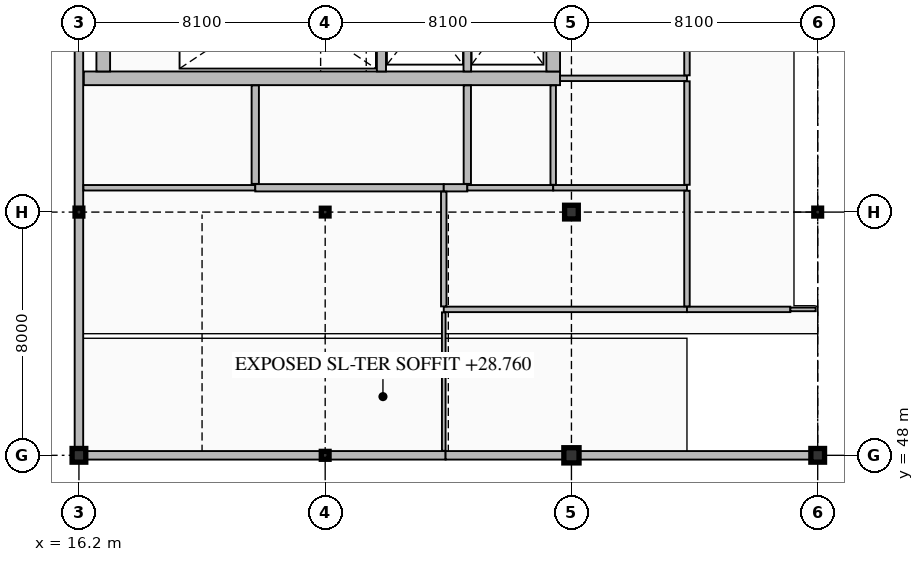
"""IFC4 building model, lengths in metres.
Left out: names, types, materials, properties, quantities, classifications, styles, units other than length and angle.
Written with IfcOpenShell. Run it as: python <this file> out.ifc"""

import sys

from ifc_helpers import new_model, si_unit, direction, frame, frame_2d, origin, origin_2d, place, context, subcontext, project, spatial, rectangle, hollow_rectangle, i_section, extrude, element, fill, save


model = new_model("IFC4")
c1 = context("Model", 3, precision=1e-05, world=origin(), true_north=direction((0.0, 1.0)))
c2 = subcontext(c1, "Body", "Model", "MODEL_VIEW")
j1 = project(units=[si_unit("LENGTHUNIT", "METRE"), si_unit("PLANEANGLEUNIT", "RADIAN")], contexts=[c1])
p1 = place(None, origin())
s1 = spatial("IfcSite", under=j1, at=p1, CompositionType="ELEMENT")
p2 = place(p1, origin())
s2 = spatial("IfcBuilding", under=s1, at=p2, CompositionType="ELEMENT")
p3 = place(p2, frame((0.0, 0.0, 24.9)))
s3 = spatial("IfcBuildingStorey", under=s2, at=p3, CompositionType="ELEMENT", Elevation=24.9)
p4 = place(p3, frame((16.36, 60.4, 0.0), z_axis=(0.0, 0.0, 1.0), x_axis=(1.0, 0.0, 0.0)))
e1 = element("IfcWall", 1, at=p4, inside=s3, PredefinedType="SHEAR", context=c2, shape_type="SweptSolid", body=[
    extrude(rectangle(XDim=15.665, YDim=0.45, at=frame_2d((7.833, 0.0))), origin(), (0.0, 0.0, 1.0), 4.2),
])
p5 = place(p4, frame((1.39, 0.0, 0.0)))
e2 = element("IfcOpeningElement", 2, at=p5, cuts=e1, PredefinedType="OPENING", context=c2, shape_type="SweptSolid", body=[
    extrude(rectangle(XDim=1.15, YDim=2.25, at=frame_2d((0.575, 1.125))), frame((0.0, 0.235, 0.0), z_axis=(0.0, -1.0, 0.0), x_axis=(1.0, 0.0, 0.0)), (0.0, 0.0, 1.0), 0.47),
])
p6 = place(p4, frame((10.673, 0.0, 0.0)))
e3 = element("IfcOpeningElement", 3, at=p6, cuts=e1, PredefinedType="OPENING", context=c2, shape_type="SweptSolid", body=[
    extrude(rectangle(XDim=1.1, YDim=2.2, at=frame_2d((0.55, 1.1))), frame((0.0, 0.235, 0.0), z_axis=(0.0, -1.0, 0.0), x_axis=(1.0, 0.0, 0.0)), (0.0, 0.0, 1.0), 0.47),
])
p7 = place(p4, frame((13.387, 0.0, 0.0)))
e4 = element("IfcOpeningElement", 4, at=p7, cuts=e1, PredefinedType="OPENING", context=c2, shape_type="SweptSolid", body=[
    extrude(rectangle(XDim=1.1, YDim=2.2, at=frame_2d((0.55, 1.1))), frame((0.0, 0.235, 0.0), z_axis=(0.0, -1.0, 0.0), x_axis=(1.0, 0.0, 0.0)), (0.0, 0.0, 1.0), 0.47),
])
for number, where, z_axis, x_axis in (
    (5, (17.0, 60.625, 0.0), (0.0, 0.0, 1.0), (0.0, 1.0, 0.0)),
    (6, (31.8, 60.625, 0.0), (0.0, 0.0, 1.0), (0.0, 1.0, 0.0)),
):
    element("IfcWall", number, at=place(p3, frame(where, z_axis=z_axis, x_axis=x_axis)), inside=s3, PredefinedType="SHEAR", context=c2, shape_type="SweptSolid", body=[
        extrude(rectangle(XDim=7.95, YDim=0.45, at=frame_2d((3.975, 0.0))), origin(), (0.0, 0.0, 1.0), 4.2),
    ])
p8 = place(p3, frame((26.15, 60.625, 0.0), z_axis=(0.0, 0.0, 1.0), x_axis=(0.0, 1.0, 0.0)))
e7 = element("IfcWall", 7, at=p8, inside=s3, PredefinedType="SHEAR", context=c2, shape_type="SweptSolid", body=[
    extrude(rectangle(XDim=7.95, YDim=0.3, at=frame_2d((3.975, 0.0))), origin(), (0.0, 0.0, 1.0), 4.2),
])
p9 = place(p3, frame((28.975, 60.625, 0.0), z_axis=(0.0, 0.0, 1.0), x_axis=(0.0, 1.0, 0.0)))
e8 = element("IfcWall", 8, at=p9, inside=s3, PredefinedType="SHEAR", context=c2, shape_type="SweptSolid", body=[
    extrude(rectangle(XDim=7.95, YDim=0.25, at=frame_2d((3.975, 0.0))), origin(), (0.0, 0.0, 1.0), 4.2),
])
p10 = place(p3, frame((16.2, 48.0, 0.0), z_axis=(0.0, 0.0, 1.0), x_axis=(1.0, 0.0, 0.0)))
e9 = element("IfcColumn", 9, at=p10, inside=s3, PredefinedType="COLUMN", context=c2, shape_type="SweptSolid", body=[
    extrude(rectangle(XDim=0.45, YDim=0.45, at=origin_2d()), origin(), (0.0, 0.0, 1.0), 3.86),
])
p11 = place(p3, frame((16.2, 56.0, 0.0), z_axis=(0.0, 0.0, 1.0), x_axis=(1.0, 0.0, 0.0)))
e10 = element("IfcColumn", 10, at=p11, inside=s3, PredefinedType="COLUMN", context=c2, shape_type="SweptSolid", body=[
    extrude(i_section(OverallWidth=0.256, OverallDepth=0.26, WebThickness=0.011, FlangeThickness=0.017, FilletRadius=0.013, at=origin_2d()), origin(), (0.0, 0.0, 1.0), 4.2),
])
p12 = place(p3, frame((24.3, 48.0, 0.0), z_axis=(0.0, 0.0, 1.0), x_axis=(1.0, 0.0, 0.0)))
e11 = element("IfcColumn", 11, at=p12, inside=s3, PredefinedType="COLUMN", context=c2, shape_type="SweptSolid", body=[
    extrude(i_section(OverallWidth=0.256, OverallDepth=0.26, WebThickness=0.011, FlangeThickness=0.017, FilletRadius=0.013, at=origin_2d()), origin(), (0.0, 0.0, 1.0), 3.86),
])
p13 = place(p3, frame((24.3, 56.0, 0.0), z_axis=(0.0, 0.0, 1.0), x_axis=(1.0, 0.0, 0.0)))
e12 = element("IfcColumn", 12, at=p13, inside=s3, PredefinedType="COLUMN", context=c2, shape_type="SweptSolid", body=[
    extrude(hollow_rectangle(XDim=0.254, YDim=0.254, WallThickness=0.013, InnerFilletRadius=0.013, OuterFilletRadius=0.025, at=origin_2d()), origin(), (0.0, 0.0, 1.0), 4.2),
])
p14 = place(p3, frame((32.4, 48.0, 0.0), z_axis=(0.0, 0.0, 1.0), x_axis=(1.0, 0.0, 0.0)))
e13 = element("IfcColumn", 13, at=p14, inside=s3, PredefinedType="COLUMN", context=c2, shape_type="SweptSolid", body=[
    extrude(rectangle(XDim=0.5, YDim=0.5, at=origin_2d()), origin(), (0.0, 0.0, 1.0), 3.86),
])
p15 = place(p3, frame((32.4, 56.0, 0.0), z_axis=(0.0, 0.0, 1.0), x_axis=(1.0, 0.0, 0.0)))
e14 = element("IfcColumn", 14, at=p15, inside=s3, PredefinedType="COLUMN", context=c2, shape_type="SweptSolid", body=[
    extrude(rectangle(XDim=0.45, YDim=0.45, at=origin_2d()), origin(), (0.0, 0.0, 1.0), 4.2),
])
p16 = place(p3, frame((40.5, 48.0, 0.0), z_axis=(0.0, 0.0, 1.0), x_axis=(1.0, 0.0, 0.0)))
e15 = element("IfcColumn", 15, at=p16, inside=s3, PredefinedType="COLUMN", context=c2, shape_type="SweptSolid", body=[
    extrude(rectangle(XDim=0.45, YDim=0.45, at=origin_2d()), origin(), (0.0, 0.0, 1.0), 3.96),
])
p17 = place(p3, frame((40.5, 56.0, 0.0), z_axis=(0.0, 0.0, 1.0), x_axis=(1.0, 0.0, 0.0)))
e16 = element("IfcColumn", 16, at=p17, inside=s3, PredefinedType="COLUMN", context=c2, shape_type="SweptSolid", body=[
    extrude(i_section(OverallWidth=0.256, OverallDepth=0.26, WebThickness=0.011, FlangeThickness=0.017, FilletRadius=0.013, at=origin_2d()), origin(), (0.0, 0.0, 1.0), 4.2),
])
p18 = place(p3, frame((16.2, 64.0, 0.0), z_axis=(0.0, 0.0, 1.0), x_axis=(0.0, -1.0, 0.0)))
e17 = element("IfcWall", 17, at=p18, inside=s3, PredefinedType="SOLIDWALL", context=c2, shape_type="SweptSolid", body=[
    extrude(rectangle(XDim=16.0, YDim=0.28, at=frame_2d((8.0, 0.0))), origin(), (0.0, 0.0, 1.0), 3.352),
])
p19 = place(p3, frame((16.2, 48.0, 0.0), z_axis=(0.0, 0.0, 1.0), x_axis=(1.0, 0.0, 0.0)))
e18 = element("IfcWall", 18, at=p19, inside=s3, PredefinedType="SOLIDWALL", context=c2, shape_type="SweptSolid", body=[
    extrude(rectangle(XDim=12.06, YDim=0.28, at=frame_2d((6.03, 0.0))), origin(), (0.0, 0.0, 1.0), 3.302),
])
p20 = place(p19, frame((5.2, 0.0, 0.0)))
e19 = element("IfcOpeningElement", 19, at=p20, cuts=e18, PredefinedType="OPENING", context=c2, shape_type="SweptSolid", body=[
    extrude(rectangle(XDim=1.5, YDim=2.3, at=frame_2d((0.75, 1.15))), frame((0.0, 0.15, 0.0), z_axis=(0.0, -1.0, 0.0), x_axis=(1.0, 0.0, 0.0)), (0.0, 0.0, 1.0), 0.3),
])
p21 = place(p3, frame((28.26, 48.0, 0.0), z_axis=(0.0, 0.0, 1.0), x_axis=(1.0, 0.0, 0.0)))
e20 = element("IfcWall", 20, at=p21, inside=s3, PredefinedType="SOLIDWALL", context=c2, shape_type="SweptSolid", body=[
    extrude(rectangle(XDim=12.06, YDim=0.28, at=frame_2d((6.03, 0.0))), origin(), (0.0, 0.0, 1.0), 3.302),
])
p22 = place(p21, frame((6.3, 0.0, 0.95)))
e21 = element("IfcOpeningElement", 21, at=p22, cuts=e20, PredefinedType="OPENING", context=c2, shape_type="SweptSolid", body=[
    extrude(rectangle(XDim=3.6, YDim=0.9, at=frame_2d((1.8, 0.45))), frame((0.0, 0.15, 0.0), z_axis=(0.0, -1.0, 0.0), x_axis=(1.0, 0.0, 0.0)), (0.0, 0.0, 1.0), 0.3),
])
p23 = place(p3, frame((16.348, 56.8, 0.0), z_axis=(0.0, 0.0, 1.0), x_axis=(1.0, 0.0, 0.0)))
e22 = element("IfcWall", 22, at=p23, inside=s3, PredefinedType="PARTITIONING", context=c2, shape_type="SweptSolid", body=[
    extrude(rectangle(XDim=5.652, YDim=0.18, at=frame_2d((2.826, 0.0))), origin(), (0.0, 0.0, 1.0), 3.96),
])
p24 = place(p23, frame((2.276, 0.0, 0.0)))
e23 = element("IfcOpeningElement", 23, at=p24, cuts=e22, PredefinedType="OPENING", context=c2, shape_type="SweptSolid", body=[
    extrude(rectangle(XDim=1.1, YDim=2.2, at=frame_2d((0.55, 1.1))), frame((0.0, 0.1, 0.0), z_axis=(0.0, -1.0, 0.0), x_axis=(1.0, 0.0, 0.0)), (0.0, 0.0, 1.0), 0.2),
])
p25 = place(p3, frame((22.0, 56.8, 0.0), z_axis=(0.0, 0.0, 1.0), x_axis=(1.0, 0.0, 0.0)))
e24 = element("IfcWall", 24, at=p25, inside=s3, PredefinedType="PARTITIONING", context=c2, shape_type="SweptSolid", body=[
    extrude(rectangle(XDim=6.2, YDim=0.24, at=frame_2d((3.1, 0.0))), origin(), (0.0, 0.0, 1.0), 3.96),
])
p26 = place(p25, frame((3.988, 0.0, 0.0)))
e25 = element("IfcOpeningElement", 25, at=p26, cuts=e24, PredefinedType="OPENING", context=c2, shape_type="SweptSolid", body=[
    extrude(rectangle(XDim=1.2, YDim=2.3, at=frame_2d((0.6, 1.15))), frame((0.0, 0.13, 0.0), z_axis=(0.0, -1.0, 0.0), x_axis=(1.0, 0.0, 0.0)), (0.0, 0.0, 1.0), 0.26),
])
p27 = place(p3, frame((28.2, 52.8, 0.0), z_axis=(0.0, 0.0, 1.0), x_axis=(1.0, 0.0, 0.0)))
e26 = element("IfcWall", 26, at=p27, inside=s3, PredefinedType="PARTITIONING", context=c2, shape_type="SweptSolid", body=[
    extrude(rectangle(XDim=8.0, YDim=0.18, at=frame_2d((4.0, 0.0))), origin(), (0.0, 0.0, 1.0), 3.96),
])
p28 = place(p27, frame((3.5, 0.0, 0.0)))
e27 = element("IfcOpeningElement", 27, at=p28, cuts=e26, PredefinedType="OPENING", context=c2, shape_type="SweptSolid", body=[
    extrude(rectangle(XDim=1.0, YDim=2.2, at=frame_2d((0.5, 1.1))), frame((0.0, 0.1, 0.0), z_axis=(0.0, -1.0, 0.0), x_axis=(1.0, 0.0, 0.0)), (0.0, 0.0, 1.0), 0.2),
])
p29 = place(p3, frame((28.2, 56.8, 0.0), z_axis=(0.0, 0.0, 1.0), x_axis=(1.0, 0.0, 0.0)))
e28 = element("IfcWall", 28, at=p29, inside=s3, PredefinedType="PARTITIONING", context=c2, shape_type="SweptSolid", body=[
    extrude(rectangle(XDim=0.775, YDim=0.24, at=frame_2d((0.388, 0.0))), origin(), (0.0, 0.0, 1.0), 3.96),
])
p30 = place(p3, frame((28.975, 56.8, 0.0), z_axis=(0.0, 0.0, 1.0), x_axis=(1.0, 0.0, 0.0)))
e29 = element("IfcWall", 29, at=p30, inside=s3, PredefinedType="PARTITIONING", context=c2, shape_type="SweptSolid", body=[
    extrude(rectangle(XDim=2.825, YDim=0.18, at=frame_2d((1.413, 0.0))), origin(), (0.0, 0.0, 1.0), 3.96),
])
p31 = place(p30, frame((0.863, 0.0, 0.0)))
e30 = element("IfcOpeningElement", 30, at=p31, cuts=e29, PredefinedType="OPENING", context=c2, shape_type="SweptSolid", body=[
    extrude(rectangle(XDim=1.1, YDim=2.2, at=frame_2d((0.55, 1.1))), frame((0.0, 0.1, 0.0), z_axis=(0.0, -1.0, 0.0), x_axis=(1.0, 0.0, 0.0)), (0.0, 0.0, 1.0), 0.2),
])
p32 = place(p3, frame((31.8, 56.8, 0.0), z_axis=(0.0, 0.0, 1.0), x_axis=(1.0, 0.0, 0.0)))
e31 = element("IfcWall", 31, at=p32, inside=s3, PredefinedType="PARTITIONING", context=c2, shape_type="SweptSolid", body=[
    extrude(rectangle(XDim=4.4, YDim=0.18, at=frame_2d((2.2, 0.0))), origin(), (0.0, 0.0, 1.0), 3.96),
])
p33 = place(p3, frame((32.025, 60.4, 0.0), z_axis=(0.0, 0.0, 1.0), x_axis=(1.0, 0.0, 0.0)))
e32 = element("IfcWall", 32, at=p33, inside=s3, PredefinedType="PARTITIONING", context=c2, shape_type="SweptSolid", body=[
    extrude(rectangle(XDim=4.175, YDim=0.18, at=frame_2d((2.087, 0.0))), origin(), (0.0, 0.0, 1.0), 3.96),
])
p34 = place(p3, frame((36.2, 52.8, 0.0), z_axis=(0.0, 0.0, 1.0), x_axis=(1.0, 0.0, 0.0)))
e33 = element("IfcWall", 33, at=p34, inside=s3, PredefinedType="PARTITIONING", context=c2, shape_type="SweptSolid", body=[
    extrude(rectangle(XDim=3.4, YDim=0.18, at=frame_2d((1.7, 0.0))), origin(), (0.0, 0.0, 1.0), 3.96),
])
p35 = place(p3, frame((39.6, 52.8, 0.0), z_axis=(0.0, 0.0, 1.0), x_axis=(1.0, 0.0, 0.0)))
e34 = element("IfcWall", 34, at=p35, inside=s3, PredefinedType="PARTITIONING", context=c2, shape_type="SweptSolid", body=[
    extrude(rectangle(XDim=0.835, YDim=0.12, at=frame_2d((0.417, 0.0))), origin(), (0.0, 0.0, 1.0), 3.96),
])
p36 = place(p3, frame((22.0, 56.928, 0.0), z_axis=(0.0, 0.0, 1.0), x_axis=(0.0, 1.0, 0.0)))
e35 = element("IfcWall", 35, at=p36, inside=s3, PredefinedType="PARTITIONING", context=c2, shape_type="SweptSolid", body=[
    extrude(rectangle(XDim=3.239, YDim=0.24, at=frame_2d((1.62, 0.0))), origin(), (0.0, 0.0, 1.0), 3.96),
])
p37 = place(p36, frame((1.119, 0.0, 0.0)))
e36 = element("IfcOpeningElement", 36, at=p37, cuts=e35, PredefinedType="OPENING", context=c2, shape_type="SweptSolid", body=[
    extrude(rectangle(XDim=1.0, YDim=2.2, at=frame_2d((0.5, 1.1))), frame((0.0, 0.13, 0.0), z_axis=(0.0, -1.0, 0.0), x_axis=(1.0, 0.0, 0.0)), (0.0, 0.0, 1.0), 0.26),
])
p38 = place(p3, frame((28.2, 48.148, 0.0), z_axis=(0.0, 0.0, 1.0), x_axis=(0.0, 1.0, 0.0)))
e37 = element("IfcWall", 37, at=p38, inside=s3, PredefinedType="PARTITIONING", context=c2, shape_type="SweptSolid", body=[
    extrude(rectangle(XDim=4.554, YDim=0.12, at=frame_2d((2.277, 0.0))), origin(), (0.0, 0.0, 1.0), 3.498),
])
p39 = place(p3, frame((28.2, 52.898, 0.0), z_axis=(0.0, 0.0, 1.0), x_axis=(0.0, 1.0, 0.0)))
e38 = element("IfcWall", 38, at=p39, inside=s3, PredefinedType="PARTITIONING", context=c2, shape_type="SweptSolid", body=[
    extrude(rectangle(XDim=3.774, YDim=0.18, at=frame_2d((1.887, 0.0))), origin(), (0.0, 0.0, 1.0), 3.498),
])
p40 = place(p39, frame((1.387, 0.0, 0.0)))
e39 = element("IfcOpeningElement", 39, at=p40, cuts=e38, PredefinedType="OPENING", context=c2, shape_type="SweptSolid", body=[
    extrude(rectangle(XDim=1.0, YDim=2.2, at=frame_2d((0.5, 1.1))), frame((0.0, 0.1, 0.0), z_axis=(0.0, -1.0, 0.0), x_axis=(1.0, 0.0, 0.0)), (0.0, 0.0, 1.0), 0.2),
])
p41 = place(p3, frame((28.975, 56.928, 0.0), z_axis=(0.0, 0.0, 1.0), x_axis=(0.0, 1.0, 0.0)))
e40 = element("IfcWall", 40, at=p41, inside=s3, PredefinedType="PARTITIONING", context=c2, shape_type="SweptSolid", body=[
    extrude(rectangle(XDim=3.239, YDim=0.24, at=frame_2d((1.62, 0.0))), origin(), (0.0, 0.0, 1.0), 3.96),
])
p42 = place(p3, frame((31.8, 56.898, 0.0), z_axis=(0.0, 0.0, 1.0), x_axis=(0.0, 1.0, 0.0)))
e41 = element("IfcWall", 41, at=p42, inside=s3, PredefinedType="PARTITIONING", context=c2, shape_type="SweptSolid", body=[
    extrude(rectangle(XDim=3.269, YDim=0.18, at=frame_2d((1.635, 0.0))), origin(), (0.0, 0.0, 1.0), 3.96),
])
p43 = place(p3, frame((36.2, 52.898, 0.0), z_axis=(0.0, 0.0, 1.0), x_axis=(0.0, 1.0, 0.0)))
e42 = element("IfcWall", 42, at=p43, inside=s3, PredefinedType="PARTITIONING", context=c2, shape_type="SweptSolid", body=[
    extrude(rectangle(XDim=3.804, YDim=0.18, at=frame_2d((1.902, 0.0))), origin(), (0.0, 0.0, 1.0), 3.96),
])
p44 = place(p43, frame((1.352, 0.0, 0.0)))
e43 = element("IfcOpeningElement", 43, at=p44, cuts=e42, PredefinedType="OPENING", context=c2, shape_type="SweptSolid", body=[
    extrude(rectangle(XDim=1.1, YDim=2.2, at=frame_2d((0.55, 1.1))), frame((0.0, 0.1, 0.0), z_axis=(0.0, -1.0, 0.0), x_axis=(1.0, 0.0, 0.0)), (0.0, 0.0, 1.0), 0.2),
])
p45 = place(p3, frame((36.2, 56.898, 0.0), z_axis=(0.0, 0.0, 1.0), x_axis=(0.0, 1.0, 0.0)))
e44 = element("IfcWall", 44, at=p45, inside=s3, PredefinedType="PARTITIONING", context=c2, shape_type="SweptSolid", body=[
    extrude(rectangle(XDim=3.404, YDim=0.18, at=frame_2d((1.702, 0.0))), origin(), (0.0, 0.0, 1.0), 3.96),
])
p46 = place(p45, frame((1.202, 0.0, 0.0)))
e45 = element("IfcOpeningElement", 45, at=p46, cuts=e44, PredefinedType="OPENING", context=c2, shape_type="SweptSolid", body=[
    extrude(rectangle(XDim=1.0, YDim=2.15, at=frame_2d((0.5, 1.075))), frame((0.0, 0.1, 0.0), z_axis=(0.0, -1.0, 0.0), x_axis=(1.0, 0.0, 0.0)), (0.0, 0.0, 1.0), 0.2),
])
p47 = place(p3, frame((36.2, 60.498, 0.0), z_axis=(0.0, 0.0, 1.0), x_axis=(0.0, 1.0, 0.0)))
e46 = element("IfcWall", 46, at=p47, inside=s3, PredefinedType="PARTITIONING", context=c2, shape_type="SweptSolid", body=[
    extrude(rectangle(XDim=2.614, YDim=0.18, at=frame_2d((1.307, 0.0))), origin(), (0.0, 0.0, 1.0), 3.96),
])
p48 = place(p47, frame((0.832, 0.0, 0.0)))
e47 = element("IfcOpeningElement", 47, at=p48, cuts=e46, PredefinedType="OPENING", context=c2, shape_type="SweptSolid", body=[
    extrude(rectangle(XDim=0.95, YDim=2.1, at=frame_2d((0.475, 1.05))), frame((0.0, 0.1, 0.0), z_axis=(0.0, -1.0, 0.0), x_axis=(1.0, 0.0, 0.0)), (0.0, 0.0, 1.0), 0.2),
])
p49 = place(p20, frame((1.5, 0.0, 0.0), z_axis=(0.0, 0.0, 1.0), x_axis=(-1.0, 0.0, 0.0)))
e48 = element("IfcDoor", 48, at=p49, inside=s3, OperationType="DOUBLE_DOOR_SINGLE_SWING", PredefinedType="DOOR", context=c2, shape_type="SweptSolid", body=[
    extrude(rectangle(XDim=1.5, YDim=2.3, at=frame_2d((0.75, 1.15))), frame((0.0, 0.025, 0.0), z_axis=(0.0, -1.0, 0.0), x_axis=(1.0, 0.0, 0.0)), (0.0, 0.0, 1.0), 0.05),
])
fill(e19, e48)
p50 = place(p22, origin())
e49 = element("IfcWindow", 49, at=p50, inside=s3, PartitioningType="TRIPLE_PANEL_VERTICAL", PredefinedType="WINDOW", context=c2, shape_type="SweptSolid", body=[
    extrude(rectangle(XDim=3.6, YDim=0.9, at=frame_2d((1.8, 0.45))), frame((0.0, 0.03, 0.0), z_axis=(0.0, -1.0, 0.0), x_axis=(1.0, 0.0, 0.0)), (0.0, 0.0, 1.0), 0.06),
])
fill(e21, e49)
p51 = place(p5, origin())
e50 = element("IfcDoor", 50, at=p51, inside=s3, OperationType="SINGLE_SWING_LEFT", PredefinedType="DOOR", context=c2, shape_type="SweptSolid", body=[
    extrude(rectangle(XDim=1.15, YDim=2.25, at=frame_2d((0.575, 1.125))), frame((0.0, 0.025, 0.0), z_axis=(0.0, -1.0, 0.0), x_axis=(1.0, 0.0, 0.0)), (0.0, 0.0, 1.0), 0.05),
])
fill(e2, e50)
p52 = place(p6, frame((1.1, 0.0, 0.0), z_axis=(0.0, 0.0, 1.0), x_axis=(-1.0, 0.0, 0.0)))
e51 = element("IfcDoor", 51, at=p52, inside=s3, OperationType="DOUBLE_DOOR_SLIDING", PredefinedType="DOOR", context=c2, shape_type="SweptSolid", body=[
    extrude(rectangle(XDim=1.1, YDim=2.2, at=frame_2d((0.55, 1.1))), frame((0.0, 0.025, 0.0), z_axis=(0.0, -1.0, 0.0), x_axis=(1.0, 0.0, 0.0)), (0.0, 0.0, 1.0), 0.05),
])
fill(e3, e51)
p53 = place(p7, frame((1.1, 0.0, 0.0), z_axis=(0.0, 0.0, 1.0), x_axis=(-1.0, 0.0, 0.0)))
e52 = element("IfcDoor", 52, at=p53, inside=s3, OperationType="DOUBLE_DOOR_SLIDING", PredefinedType="DOOR", context=c2, shape_type="SweptSolid", body=[
    extrude(rectangle(XDim=1.1, YDim=2.2, at=frame_2d((0.55, 1.1))), frame((0.0, 0.025, 0.0), z_axis=(0.0, -1.0, 0.0), x_axis=(1.0, 0.0, 0.0)), (0.0, 0.0, 1.0), 0.05),
])
fill(e4, e52)
p54 = place(p24, frame((1.1, 0.0, 0.0), z_axis=(0.0, 0.0, 1.0), x_axis=(-1.0, 0.0, 0.0)))
e53 = element("IfcDoor", 53, at=p54, inside=s3, OperationType="SINGLE_SWING_LEFT", PredefinedType="DOOR", context=c2, shape_type="SweptSolid", body=[
    extrude(rectangle(XDim=1.1, YDim=2.2, at=frame_2d((0.55, 1.1))), frame((0.0, 0.025, 0.0), z_axis=(0.0, -1.0, 0.0), x_axis=(1.0, 0.0, 0.0)), (0.0, 0.0, 1.0), 0.05),
])
fill(e23, e53)
p55 = place(p26, frame((1.2, 0.0, 0.0), z_axis=(0.0, 0.0, 1.0), x_axis=(-1.0, 0.0, 0.0)))
e54 = element("IfcDoor", 54, at=p55, inside=s3, OperationType="SINGLE_SWING_RIGHT", PredefinedType="DOOR", context=c2, shape_type="SweptSolid", body=[
    extrude(rectangle(XDim=1.2, YDim=2.3, at=frame_2d((0.6, 1.15))), frame((0.0, 0.025, 0.0), z_axis=(0.0, -1.0, 0.0), x_axis=(1.0, 0.0, 0.0)), (0.0, 0.0, 1.0), 0.05),
])
fill(e25, e54)
p56 = place(p28, frame((1.0, 0.0, 0.0), z_axis=(0.0, 0.0, 1.0), x_axis=(-1.0, 0.0, 0.0)))
e55 = element("IfcDoor", 55, at=p56, inside=s3, OperationType="SINGLE_SWING_LEFT", PredefinedType="DOOR", context=c2, shape_type="SweptSolid", body=[
    extrude(rectangle(XDim=1.0, YDim=2.2, at=frame_2d((0.5, 1.1))), frame((0.0, 0.025, 0.0), z_axis=(0.0, -1.0, 0.0), x_axis=(1.0, 0.0, 0.0)), (0.0, 0.0, 1.0), 0.05),
])
fill(e27, e55)
p57 = place(p31, frame((1.1, 0.0, 0.0), z_axis=(0.0, 0.0, 1.0), x_axis=(-1.0, 0.0, 0.0)))
e56 = element("IfcDoor", 56, at=p57, inside=s3, OperationType="SINGLE_SWING_RIGHT", PredefinedType="DOOR", context=c2, shape_type="SweptSolid", body=[
    extrude(rectangle(XDim=1.1, YDim=2.2, at=frame_2d((0.55, 1.1))), frame((0.0, 0.025, 0.0), z_axis=(0.0, -1.0, 0.0), x_axis=(1.0, 0.0, 0.0)), (0.0, 0.0, 1.0), 0.05),
])
fill(e30, e56)
p58 = place(p37, origin())
e57 = element("IfcDoor", 57, at=p58, inside=s3, OperationType="SINGLE_SWING_LEFT", PredefinedType="DOOR", context=c2, shape_type="SweptSolid", body=[
    extrude(rectangle(XDim=1.0, YDim=2.2, at=frame_2d((0.5, 1.1))), frame((0.0, 0.025, 0.0), z_axis=(0.0, -1.0, 0.0), x_axis=(1.0, 0.0, 0.0)), (0.0, 0.0, 1.0), 0.05),
])
fill(e36, e57)
p59 = place(p40, origin())
e58 = element("IfcDoor", 58, at=p59, inside=s3, OperationType="SINGLE_SWING_RIGHT", PredefinedType="DOOR", context=c2, shape_type="SweptSolid", body=[
    extrude(rectangle(XDim=1.0, YDim=2.2, at=frame_2d((0.5, 1.1))), frame((0.0, 0.025, 0.0), z_axis=(0.0, -1.0, 0.0), x_axis=(1.0, 0.0, 0.0)), (0.0, 0.0, 1.0), 0.05),
])
fill(e39, e58)
p60 = place(p44, origin())
e59 = element("IfcDoor", 59, at=p60, inside=s3, OperationType="SINGLE_SWING_LEFT", PredefinedType="DOOR", context=c2, shape_type="SweptSolid", body=[
    extrude(rectangle(XDim=1.1, YDim=2.2, at=frame_2d((0.55, 1.1))), frame((0.0, 0.025, 0.0), z_axis=(0.0, -1.0, 0.0), x_axis=(1.0, 0.0, 0.0)), (0.0, 0.0, 1.0), 0.05),
])
fill(e43, e59)
p61 = place(p46, origin())
e60 = element("IfcDoor", 60, at=p61, inside=s3, OperationType="SINGLE_SWING_RIGHT", PredefinedType="DOOR", context=c2, shape_type="SweptSolid", body=[
    extrude(rectangle(XDim=1.0, YDim=2.15, at=frame_2d((0.5, 1.075))), frame((0.0, 0.025, 0.0), z_axis=(0.0, -1.0, 0.0), x_axis=(1.0, 0.0, 0.0)), (0.0, 0.0, 1.0), 0.05),
])
fill(e45, e60)
save(model, sys.argv[1])
